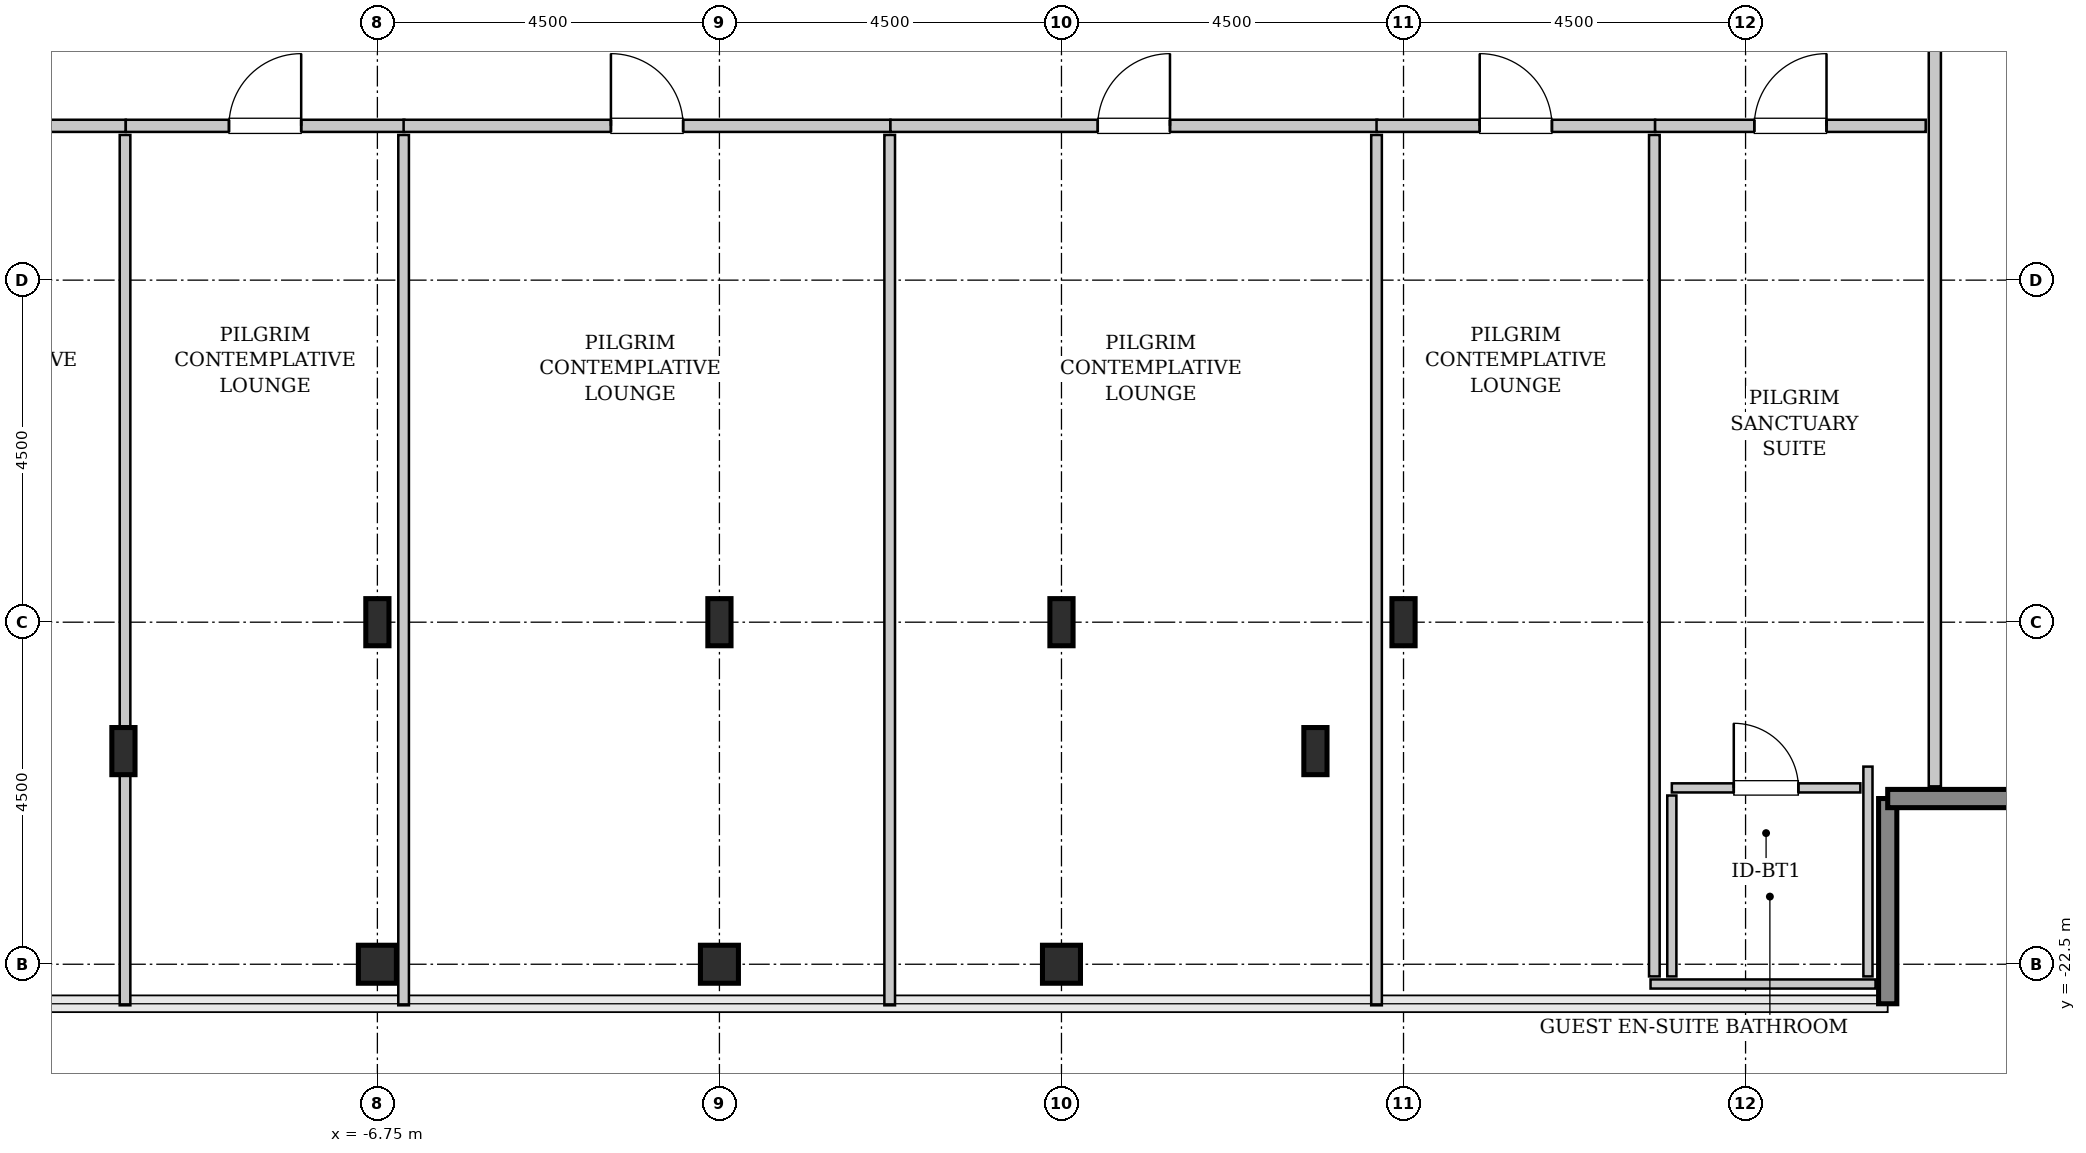
"""IFC4 building model, lengths in metres.
Left out: names, types, materials, properties, quantities, classifications, styles, units other than length and angle.
Written with IfcOpenShell. Run it as: python <this file> out.ifc"""

import sys

from ifc_helpers import new_model, si_unit, direction, frame, frame_2d, origin, origin_2d, place, context, subcontext, project, spatial, rectangle, hollow_rectangle, i_section, extrude, source, transform, mapped, element, fill, save


model = new_model("IFC4")
c1 = context("Model", 3, precision=1e-05, world=origin(), true_north=direction((0.0, 1.0)))
c2 = subcontext(c1, "Body", "Model", "MODEL_VIEW")
j1 = project(units=[si_unit("LENGTHUNIT", "METRE"), si_unit("PLANEANGLEUNIT", "RADIAN")], contexts=[c1])
p1 = place(None, origin())
s1 = spatial("IfcSite", under=j1, at=p1, CompositionType="ELEMENT")
p2 = place(p1, origin())
s2 = spatial("IfcBuilding", under=s1, at=p2, CompositionType="ELEMENT")
p3 = place(p2, frame((0.0, 0.0, 302.6)))
s3 = spatial("IfcBuildingStorey", under=s2, at=p3, CompositionType="ELEMENT", Elevation=302.6)
m1 = source(origin(), c2, "Body", "SweptSolid", [
    extrude(i_section(OverallWidth=0.305, OverallDepth=0.62, WebThickness=0.021, FlangeThickness=0.04, FilletRadius=0.027, at=origin_2d()), origin(), (0.0, 0.0, 1.0), 3.8),
])
p4 = place(p3, frame((-10.091, -19.696, 0.0), z_axis=(0.0, 0.0, 1.0), x_axis=(1.0, 0.0, 0.0)))
e1 = element("IfcColumn", 1, at=p4, inside=s3, PredefinedType="COLUMN", context=c2, shape_type="MappedRepresentation", body=[
    mapped(m1, transform((0.0, 0.0, 0.0), x_axis=(1.0, 0.0, 0.0), y_axis=(0.0, 1.0, 0.0), z_axis=(0.0, 0.0, 1.0), scale=1.0)),
])
m2 = source(origin(), c2, "Body", "SweptSolid", [
    extrude(hollow_rectangle(XDim=0.5, YDim=0.5, WallThickness=0.025, InnerFilletRadius=0.025, OuterFilletRadius=0.05, at=origin_2d()), origin(), (0.0, 0.0, 1.0), 3.8),
])
p5 = place(p3, frame((-6.75, -22.5, 0.0), z_axis=(0.0, 0.0, 1.0), x_axis=(1.0, 0.0, 0.0)))
e2 = element("IfcColumn", 2, at=p5, inside=s3, PredefinedType="COLUMN", context=c2, shape_type="MappedRepresentation", body=[
    mapped(m2, transform((0.0, 0.0, 0.0), x_axis=(1.0, 0.0, 0.0), y_axis=(0.0, 1.0, 0.0), z_axis=(0.0, 0.0, 1.0), scale=1.0)),
])
p6 = place(p3, frame((-6.75, -18.0, 0.0), z_axis=(0.0, 0.0, 1.0), x_axis=(1.0, 0.0, 0.0)))
e3 = element("IfcColumn", 3, at=p6, inside=s3, PredefinedType="COLUMN", context=c2, shape_type="MappedRepresentation", body=[
    mapped(m1, transform((0.0, 0.0, 0.0), x_axis=(1.0, 0.0, 0.0), y_axis=(0.0, 1.0, 0.0), z_axis=(0.0, 0.0, 1.0), scale=1.0)),
])
p7 = place(p3, frame((-2.25, -22.5, 0.0), z_axis=(0.0, 0.0, 1.0), x_axis=(1.0, 0.0, 0.0)))
e4 = element("IfcColumn", 4, at=p7, inside=s3, PredefinedType="COLUMN", context=c2, shape_type="MappedRepresentation", body=[
    mapped(m2, transform((0.0, 0.0, 0.0), x_axis=(1.0, 0.0, 0.0), y_axis=(0.0, 1.0, 0.0), z_axis=(0.0, 0.0, 1.0), scale=1.0)),
])
p8 = place(p3, frame((-2.25, -18.0, 0.0), z_axis=(0.0, 0.0, 1.0), x_axis=(1.0, 0.0, 0.0)))
e5 = element("IfcColumn", 5, at=p8, inside=s3, PredefinedType="COLUMN", context=c2, shape_type="MappedRepresentation", body=[
    mapped(m1, transform((0.0, 0.0, 0.0), x_axis=(1.0, 0.0, 0.0), y_axis=(0.0, 1.0, 0.0), z_axis=(0.0, 0.0, 1.0), scale=1.0)),
])
p9 = place(p3, frame((2.25, -22.5, 0.0), z_axis=(0.0, 0.0, 1.0), x_axis=(1.0, 0.0, 0.0)))
e6 = element("IfcColumn", 6, at=p9, inside=s3, PredefinedType="COLUMN", context=c2, shape_type="MappedRepresentation", body=[
    mapped(m2, transform((0.0, 0.0, 0.0), x_axis=(1.0, 0.0, 0.0), y_axis=(0.0, 1.0, 0.0), z_axis=(0.0, 0.0, 1.0), scale=1.0)),
])
for number, where, z_axis, x_axis in (
    (7, (2.25, -18.0, 0.0), (0.0, 0.0, 1.0), (1.0, 0.0, 0.0)),
    (8, (5.591, -19.696, 0.0), (0.0, 0.0, 1.0), (1.0, 0.0, 0.0)),
    (9, (6.75, -18.0, 0.0), (0.0, 0.0, 1.0), (1.0, 0.0, 0.0)),
):
    element("IfcColumn", number, at=place(p3, frame(where, z_axis=z_axis, x_axis=x_axis)), inside=s3, PredefinedType="COLUMN", context=c2, shape_type="MappedRepresentation", body=[
        mapped(m1, transform((0.0, 0.0, 0.0), x_axis=(1.0, 0.0, 0.0), y_axis=(0.0, 1.0, 0.0), z_axis=(0.0, 0.0, 1.0), scale=1.0)),
    ])
m3 = source(origin(), c2, "Body", "SweptSolid", [
    extrude(rectangle(XDim=2.7, YDim=0.24, at=frame_2d((1.35, 0.0))), origin(), (0.0, 0.0, 1.0), 3.55),
])
for number, where, z_axis, x_axis in (
    (10, (13.12, -23.02, 0.0), (0.0, 0.0, 1.0), (0.0, 1.0, 0.0)),
    (11, (13.12, -20.32, 0.0), (0.0, 0.0, 1.0), (1.0, 0.0, 0.0)),
):
    element("IfcWall", number, at=place(p3, frame(where, z_axis=z_axis, x_axis=x_axis)), inside=s3, PredefinedType="SHEAR", context=c2, shape_type="MappedRepresentation", body=[
        mapped(m3, transform((0.0, 0.0, 0.0), x_axis=(1.0, 0.0, 0.0), y_axis=(0.0, 1.0, 0.0), z_axis=(0.0, 0.0, 1.0), scale=1.0)),
    ])
m4 = source(origin(), c2, "Body", "SweptSolid", [
    extrude(rectangle(XDim=2.96, YDim=0.12, at=frame_2d((1.48, 0.0))), origin(), (0.0, 0.0, 1.0), 3.535),
])
p10 = place(p3, frame((10.0, -22.76, 0.0), z_axis=(0.0, 0.0, 1.0), x_axis=(1.0, 0.0, 0.0)))
e12 = element("IfcWall", 12, at=p10, inside=s3, PredefinedType="PLUMBINGWALL", context=c2, shape_type="MappedRepresentation", body=[
    mapped(m4, transform((0.0, 0.0, 0.0), x_axis=(1.0, 0.0, 0.0), y_axis=(0.0, 1.0, 0.0), z_axis=(0.0, 0.0, 1.0), scale=1.0)),
])
m5 = source(origin(), c2, "Body", "SweptSolid", [
    extrude(rectangle(XDim=2.76, YDim=0.12, at=frame_2d((1.38, 0.0))), origin(), (0.0, 0.0, 1.0), 3.535),
])
p11 = place(p3, frame((12.86, -22.66, 0.0), z_axis=(0.0, 0.0, 1.0), x_axis=(0.0, 1.0, 0.0)))
e13 = element("IfcWall", 13, at=p11, inside=s3, PredefinedType="PLUMBINGWALL", context=c2, shape_type="MappedRepresentation", body=[
    mapped(m5, transform((0.0, 0.0, 0.0), x_axis=(1.0, 0.0, 0.0), y_axis=(0.0, 1.0, 0.0), z_axis=(0.0, 0.0, 1.0), scale=1.0)),
])
m6 = source(origin(), c2, "Body", "SweptSolid", [
    extrude(rectangle(XDim=2.48, YDim=0.12, at=frame_2d((1.24, 0.0))), origin(), (0.0, 0.0, 1.0), 3.535),
])
p12 = place(p3, frame((10.28, -20.18, 0.0), z_axis=(0.0, 0.0, 1.0), x_axis=(1.0, 0.0, 0.0)))
e14 = element("IfcWall", 14, at=p12, inside=s3, PredefinedType="PLUMBINGWALL", context=c2, shape_type="MappedRepresentation", body=[
    mapped(m6, transform((0.0, 0.0, 0.0), x_axis=(1.0, 0.0, 0.0), y_axis=(0.0, 1.0, 0.0), z_axis=(0.0, 0.0, 1.0), scale=1.0)),
])
p13 = place(p12, frame((0.815, 0.0, 0.0)))
e15 = element("IfcOpeningElement", 15, at=p13, cuts=e14, PredefinedType="OPENING", context=c2, shape_type="SweptSolid", body=[
    extrude(rectangle(XDim=0.85, YDim=2.1, at=frame_2d((0.425, 1.05))), frame((0.0, 0.07, 0.0), z_axis=(0.0, -1.0, 0.0), x_axis=(1.0, 0.0, 0.0)), (0.0, 0.0, 1.0), 0.14),
])
m7 = source(origin(), c2, "Body", "SweptSolid", [
    extrude(rectangle(XDim=2.38, YDim=0.12, at=frame_2d((1.19, 0.0))), origin(), (0.0, 0.0, 1.0), 3.535),
])
p14 = place(p3, frame((10.28, -22.66, 0.0), z_axis=(0.0, 0.0, 1.0), x_axis=(0.0, 1.0, 0.0)))
e16 = element("IfcWall", 16, at=p14, inside=s3, PredefinedType="PLUMBINGWALL", context=c2, shape_type="MappedRepresentation", body=[
    mapped(m7, transform((0.0, 0.0, 0.0), x_axis=(1.0, 0.0, 0.0), y_axis=(0.0, 1.0, 0.0), z_axis=(0.0, 0.0, 1.0), scale=1.0)),
])
m8 = source(origin(), c2, "Body", "SweptSolid", [
    extrude(rectangle(XDim=14.365, YDim=0.16, at=frame_2d((7.183, 0.0))), origin(), (0.0, 0.0, 1.0), 3.535),
])
p15 = place(p3, frame((13.74, -20.16, 0.0), z_axis=(0.0, 0.0, 1.0), x_axis=(0.0, 1.0, 0.0)))
e17 = element("IfcWall", 17, at=p15, inside=s3, PredefinedType="PARTITIONING", context=c2, shape_type="MappedRepresentation", body=[
    mapped(m8, transform((0.0, 0.0, 0.0), x_axis=(1.0, 0.0, 0.0), y_axis=(0.0, 1.0, 0.0), z_axis=(0.0, 0.0, 1.0), scale=1.0)),
])
p16 = place(p15, frame((11.032, 0.0, 0.0)))
e18 = element("IfcOpeningElement", 18, at=p16, cuts=e17, PredefinedType="OPENING", context=c2, shape_type="SweptSolid", body=[
    extrude(rectangle(XDim=0.95, YDim=2.1, at=frame_2d((0.475, 1.05))), frame((0.0, 0.09, 0.0), z_axis=(0.0, -1.0, 0.0), x_axis=(1.0, 0.0, 0.0)), (0.0, 0.0, 1.0), 0.18),
])
m9 = source(origin(), c2, "Body", "SweptSolid", [
    extrude(rectangle(XDim=3.56, YDim=0.16, at=frame_2d((1.78, 0.0))), origin(), (0.0, 0.0, 1.0), 3.535),
])
p17 = place(p3, frame((-13.62, -11.47, 0.0), z_axis=(0.0, 0.0, 1.0), x_axis=(1.0, 0.0, 0.0)))
e19 = element("IfcWall", 19, at=p17, inside=s3, PredefinedType="PARTITIONING", context=c2, shape_type="MappedRepresentation", body=[
    mapped(m9, transform((0.0, 0.0, 0.0), x_axis=(1.0, 0.0, 0.0), y_axis=(0.0, 1.0, 0.0), z_axis=(0.0, 0.0, 1.0), scale=1.0)),
])
p18 = place(p17, frame((1.305, 0.0, 0.0)))
e20 = element("IfcOpeningElement", 20, at=p18, cuts=e19, PredefinedType="OPENING", context=c2, shape_type="SweptSolid", body=[
    extrude(rectangle(XDim=0.95, YDim=2.1, at=frame_2d((0.475, 1.05))), frame((0.0, 0.09, 0.0), z_axis=(0.0, -1.0, 0.0), x_axis=(1.0, 0.0, 0.0)), (0.0, 0.0, 1.0), 0.18),
])
m10 = source(origin(), c2, "Body", "SweptSolid", [
    extrude(rectangle(XDim=11.45, YDim=0.14, at=frame_2d((5.725, 0.0))), origin(), (0.0, 0.0, 1.0), 3.535),
])
p19 = place(p3, frame((-10.07, -23.04, 0.0), z_axis=(0.0, 0.0, 1.0), x_axis=(0.0, 1.0, 0.0)))
e21 = element("IfcWall", 21, at=p19, inside=s3, PredefinedType="PARTITIONING", context=c2, shape_type="MappedRepresentation", body=[
    mapped(m10, transform((0.0, 0.0, 0.0), x_axis=(1.0, 0.0, 0.0), y_axis=(0.0, 1.0, 0.0), z_axis=(0.0, 0.0, 1.0), scale=1.0)),
])
m11 = source(origin(), c2, "Body", "SweptSolid", [
    extrude(rectangle(XDim=3.665, YDim=0.16, at=frame_2d((1.833, 0.0))), origin(), (0.0, 0.0, 1.0), 3.535),
])
p20 = place(p3, frame((-10.06, -11.47, 0.0), z_axis=(0.0, 0.0, 1.0), x_axis=(1.0, 0.0, 0.0)))
e22 = element("IfcWall", 22, at=p20, inside=s3, PredefinedType="PARTITIONING", context=c2, shape_type="MappedRepresentation", body=[
    mapped(m11, transform((0.0, 0.0, 0.0), x_axis=(1.0, 0.0, 0.0), y_axis=(0.0, 1.0, 0.0), z_axis=(0.0, 0.0, 1.0), scale=1.0)),
])
p21 = place(p20, frame((1.357, 0.0, 0.0)))
e23 = element("IfcOpeningElement", 23, at=p21, cuts=e22, PredefinedType="OPENING", context=c2, shape_type="SweptSolid", body=[
    extrude(rectangle(XDim=0.95, YDim=2.1, at=frame_2d((0.475, 1.05))), frame((0.0, 0.09, 0.0), z_axis=(0.0, -1.0, 0.0), x_axis=(1.0, 0.0, 0.0)), (0.0, 0.0, 1.0), 0.18),
])
m12 = source(origin(), c2, "Body", "SweptSolid", [
    extrude(rectangle(XDim=11.45, YDim=0.14, at=frame_2d((5.725, 0.0))), origin(), (0.0, 0.0, 1.0), 2.975),
])
p22 = place(p3, frame((-6.405, -23.04, 0.0), z_axis=(0.0, 0.0, 1.0), x_axis=(0.0, 1.0, 0.0)))
e24 = element("IfcWall", 24, at=p22, inside=s3, PredefinedType="PARTITIONING", context=c2, shape_type="MappedRepresentation", body=[
    mapped(m12, transform((0.0, 0.0, 0.0), x_axis=(1.0, 0.0, 0.0), y_axis=(0.0, 1.0, 0.0), z_axis=(0.0, 0.0, 1.0), scale=1.0)),
])
m13 = source(origin(), c2, "Body", "SweptSolid", [
    extrude(rectangle(XDim=6.405, YDim=0.16, at=frame_2d((3.203, 0.0))), origin(), (0.0, 0.0, 1.0), 3.535),
])
p23 = place(p3, frame((-6.405, -11.47, 0.0), z_axis=(0.0, 0.0, 1.0), x_axis=(1.0, 0.0, 0.0)))
e25 = element("IfcWall", 25, at=p23, inside=s3, PredefinedType="PARTITIONING", context=c2, shape_type="MappedRepresentation", body=[
    mapped(m13, transform((0.0, 0.0, 0.0), x_axis=(1.0, 0.0, 0.0), y_axis=(0.0, 1.0, 0.0), z_axis=(0.0, 0.0, 1.0), scale=1.0)),
])
p24 = place(p23, frame((2.728, 0.0, 0.0)))
e26 = element("IfcOpeningElement", 26, at=p24, cuts=e25, PredefinedType="OPENING", context=c2, shape_type="SweptSolid", body=[
    extrude(rectangle(XDim=0.95, YDim=2.1, at=frame_2d((0.475, 1.05))), frame((0.0, 0.09, 0.0), z_axis=(0.0, -1.0, 0.0), x_axis=(1.0, 0.0, 0.0)), (0.0, 0.0, 1.0), 0.18),
])
p25 = place(p3, frame((-0.01, -23.04, 0.0), z_axis=(0.0, 0.0, 1.0), x_axis=(0.0, 1.0, 0.0)))
e27 = element("IfcWall", 27, at=p25, inside=s3, PredefinedType="PARTITIONING", context=c2, shape_type="MappedRepresentation", body=[
    mapped(m10, transform((0.0, 0.0, 0.0), x_axis=(1.0, 0.0, 0.0), y_axis=(0.0, 1.0, 0.0), z_axis=(0.0, 0.0, 1.0), scale=1.0)),
])
p26 = place(p3, frame((0.0, -11.47, 0.0), z_axis=(0.0, 0.0, 1.0), x_axis=(1.0, 0.0, 0.0)))
e28 = element("IfcWall", 28, at=p26, inside=s3, PredefinedType="PARTITIONING", context=c2, shape_type="MappedRepresentation", body=[
    mapped(m13, transform((0.0, 0.0, 0.0), x_axis=(1.0, 0.0, 0.0), y_axis=(0.0, 1.0, 0.0), z_axis=(0.0, 0.0, 1.0), scale=1.0)),
])
p27 = place(p26, frame((2.728, 0.0, 0.0)))
e29 = element("IfcOpeningElement", 29, at=p27, cuts=e28, PredefinedType="OPENING", context=c2, shape_type="SweptSolid", body=[
    extrude(rectangle(XDim=0.95, YDim=2.1, at=frame_2d((0.475, 1.05))), frame((0.0, 0.09, 0.0), z_axis=(0.0, -1.0, 0.0), x_axis=(1.0, 0.0, 0.0)), (0.0, 0.0, 1.0), 0.18),
])
p28 = place(p3, frame((6.395, -23.04, 0.0), z_axis=(0.0, 0.0, 1.0), x_axis=(0.0, 1.0, 0.0)))
e30 = element("IfcWall", 30, at=p28, inside=s3, PredefinedType="PARTITIONING", context=c2, shape_type="MappedRepresentation", body=[
    mapped(m10, transform((0.0, 0.0, 0.0), x_axis=(1.0, 0.0, 0.0), y_axis=(0.0, 1.0, 0.0), z_axis=(0.0, 0.0, 1.0), scale=1.0)),
])
p29 = place(p3, frame((6.395, -11.47, 0.0), z_axis=(0.0, 0.0, 1.0), x_axis=(1.0, 0.0, 0.0)))
e31 = element("IfcWall", 31, at=p29, inside=s3, PredefinedType="PARTITIONING", context=c2, shape_type="MappedRepresentation", body=[
    mapped(m11, transform((0.0, 0.0, 0.0), x_axis=(1.0, 0.0, 0.0), y_axis=(0.0, 1.0, 0.0), z_axis=(0.0, 0.0, 1.0), scale=1.0)),
])
p30 = place(p29, frame((1.357, 0.0, 0.0)))
e32 = element("IfcOpeningElement", 32, at=p30, cuts=e31, PredefinedType="OPENING", context=c2, shape_type="SweptSolid", body=[
    extrude(rectangle(XDim=0.95, YDim=2.1, at=frame_2d((0.475, 1.05))), frame((0.0, 0.09, 0.0), z_axis=(0.0, -1.0, 0.0), x_axis=(1.0, 0.0, 0.0)), (0.0, 0.0, 1.0), 0.18),
])
m14 = source(origin(), c2, "Body", "SweptSolid", [
    extrude(rectangle(XDim=11.07, YDim=0.14, at=frame_2d((5.535, 0.0))), origin(), (0.0, 0.0, 1.0), 3.535),
])
p31 = place(p3, frame((10.05, -22.66, 0.0), z_axis=(0.0, 0.0, 1.0), x_axis=(0.0, 1.0, 0.0)))
e33 = element("IfcWall", 33, at=p31, inside=s3, PredefinedType="PARTITIONING", context=c2, shape_type="MappedRepresentation", body=[
    mapped(m14, transform((0.0, 0.0, 0.0), x_axis=(1.0, 0.0, 0.0), y_axis=(0.0, 1.0, 0.0), z_axis=(0.0, 0.0, 1.0), scale=1.0)),
])
p32 = place(p3, frame((10.06, -11.47, 0.0), z_axis=(0.0, 0.0, 1.0), x_axis=(1.0, 0.0, 0.0)))
e34 = element("IfcWall", 34, at=p32, inside=s3, PredefinedType="PARTITIONING", context=c2, shape_type="MappedRepresentation", body=[
    mapped(m9, transform((0.0, 0.0, 0.0), x_axis=(1.0, 0.0, 0.0), y_axis=(0.0, 1.0, 0.0), z_axis=(0.0, 0.0, 1.0), scale=1.0)),
])
p33 = place(p32, frame((1.305, 0.0, 0.0)))
e35 = element("IfcOpeningElement", 35, at=p33, cuts=e34, PredefinedType="OPENING", context=c2, shape_type="SweptSolid", body=[
    extrude(rectangle(XDim=0.95, YDim=2.1, at=frame_2d((0.475, 1.05))), frame((0.0, 0.09, 0.0), z_axis=(0.0, -1.0, 0.0), x_axis=(1.0, 0.0, 0.0)), (0.0, 0.0, 1.0), 0.18),
])
m15 = source(origin(), c2, "Body", "SweptSolid", [
    extrude(rectangle(XDim=0.85, YDim=2.1, at=frame_2d((0.425, 1.05))), frame((0.0, 0.025, 0.0), z_axis=(0.0, -1.0, 0.0), x_axis=(1.0, 0.0, 0.0)), (0.0, 0.0, 1.0), 0.05),
])
p34 = place(p13, origin())
e36 = element("IfcDoor", 36, at=p34, inside=s3, OperationType="SINGLE_SWING_LEFT", PredefinedType="DOOR", context=c2, shape_type="MappedRepresentation", body=[
    mapped(m15, transform((0.0, 0.0, 0.0), x_axis=(1.0, 0.0, 0.0), y_axis=(0.0, 1.0, 0.0), z_axis=(0.0, 0.0, 1.0), scale=1.0)),
])
fill(e15, e36)
m16 = source(origin(), c2, "Body", "SweptSolid", [
    extrude(rectangle(XDim=0.95, YDim=2.1, at=frame_2d((0.475, 1.05))), frame((0.0, 0.025, 0.0), z_axis=(0.0, -1.0, 0.0), x_axis=(1.0, 0.0, 0.0)), (0.0, 0.0, 1.0), 0.05),
])
p35 = place(p21, origin())
e37 = element("IfcDoor", 37, at=p35, inside=s3, OperationType="SINGLE_SWING_RIGHT", PredefinedType="DOOR", context=c2, shape_type="MappedRepresentation", body=[
    mapped(m16, transform((0.0, 0.0, 0.0), x_axis=(1.0, 0.0, 0.0), y_axis=(0.0, 1.0, 0.0), z_axis=(0.0, 0.0, 1.0), scale=1.0)),
])
fill(e23, e37)
p36 = place(p24, origin())
e38 = element("IfcDoor", 38, at=p36, inside=s3, OperationType="SINGLE_SWING_LEFT", PredefinedType="DOOR", context=c2, shape_type="MappedRepresentation", body=[
    mapped(m16, transform((0.0, 0.0, 0.0), x_axis=(1.0, 0.0, 0.0), y_axis=(0.0, 1.0, 0.0), z_axis=(0.0, 0.0, 1.0), scale=1.0)),
])
fill(e26, e38)
p37 = place(p27, origin())
e39 = element("IfcDoor", 39, at=p37, inside=s3, OperationType="SINGLE_SWING_RIGHT", PredefinedType="DOOR", context=c2, shape_type="MappedRepresentation", body=[
    mapped(m16, transform((0.0, 0.0, 0.0), x_axis=(1.0, 0.0, 0.0), y_axis=(0.0, 1.0, 0.0), z_axis=(0.0, 0.0, 1.0), scale=1.0)),
])
fill(e29, e39)
p38 = place(p30, origin())
e40 = element("IfcDoor", 40, at=p38, inside=s3, OperationType="SINGLE_SWING_LEFT", PredefinedType="DOOR", context=c2, shape_type="MappedRepresentation", body=[
    mapped(m16, transform((0.0, 0.0, 0.0), x_axis=(1.0, 0.0, 0.0), y_axis=(0.0, 1.0, 0.0), z_axis=(0.0, 0.0, 1.0), scale=1.0)),
])
fill(e32, e40)
p39 = place(p33, origin())
e41 = element("IfcDoor", 41, at=p39, inside=s3, OperationType="SINGLE_SWING_RIGHT", PredefinedType="DOOR", context=c2, shape_type="MappedRepresentation", body=[
    mapped(m16, transform((0.0, 0.0, 0.0), x_axis=(1.0, 0.0, 0.0), y_axis=(0.0, 1.0, 0.0), z_axis=(0.0, 0.0, 1.0), scale=1.0)),
])
fill(e35, e41)
save(model, sys.argv[1])
